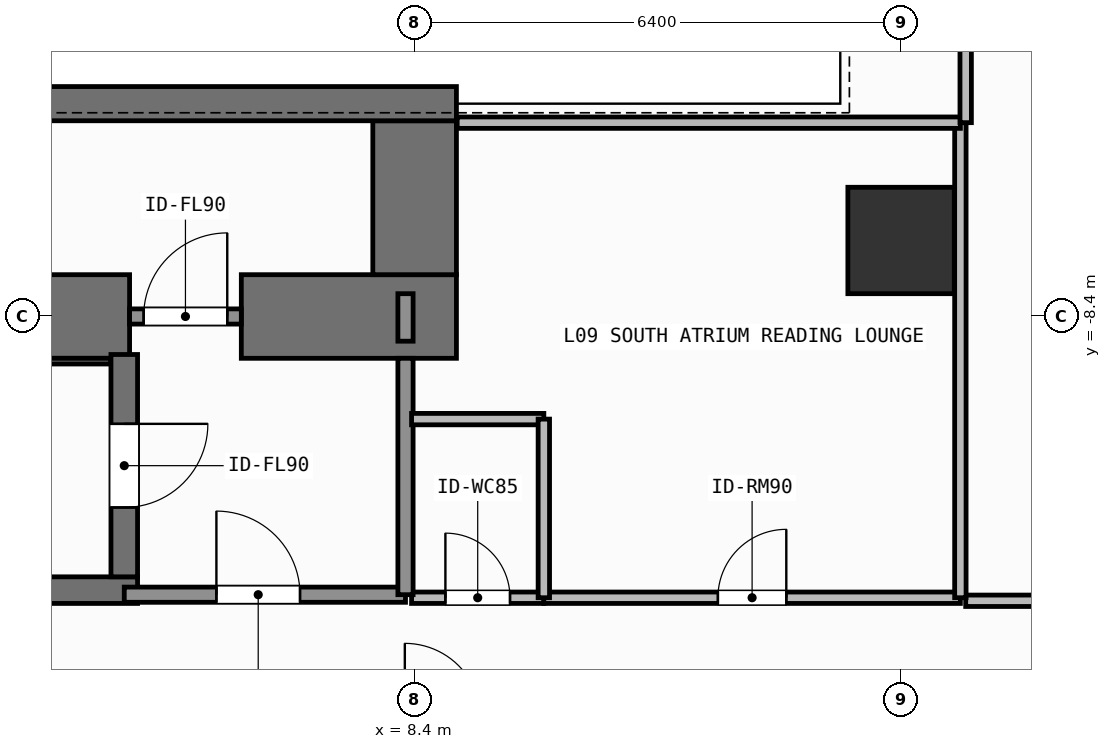
"""IFC4 building model, lengths in metres.
Left out: names, types, materials, properties, quantities, classifications, styles, units other than length and angle.
Written with IfcOpenShell. Run it as: python <this file> out.ifc"""

import sys

from ifc_helpers import new_model, si_unit, direction, frame, frame_2d, origin, origin_2d, place, context, subcontext, project, spatial, rectangle, extrude, element, fill, save


model = new_model("IFC4")
c1 = context("Model", 3, precision=1e-05, world=origin(), true_north=direction((0.0, 1.0)))
c2 = subcontext(c1, "Body", "Model", "MODEL_VIEW")
j1 = project(units=[si_unit("LENGTHUNIT", "METRE"), si_unit("PLANEANGLEUNIT", "RADIAN")], contexts=[c1])
p1 = place(None, origin())
s1 = spatial("IfcSite", under=j1, at=p1, CompositionType="ELEMENT")
p2 = place(p1, origin())
s2 = spatial("IfcBuilding", under=s1, at=p2, CompositionType="ELEMENT")
p3 = place(p2, frame((0.0, 0.0, 34.5)))
s3 = spatial("IfcBuildingStorey", under=s2, at=p3, CompositionType="ELEMENT", Elevation=34.5)
p4 = place(p3, frame((-2.62, -8.4, 0.0), z_axis=(0.0, 0.0, 1.0), x_axis=(1.0, 0.0, 0.0)))
e1 = element("IfcWall", 1, at=p4, inside=s3, PredefinedType="SHEAR", context=c2, shape_type="SweptSolid", body=[
    extrude(rectangle(XDim=7.27, YDim=1.1, at=frame_2d((3.635, 0.0))), origin(), (0.0, 0.0, 1.0), 3.9),
])
p5 = place(p3, frame((6.12, -8.4, 0.0), z_axis=(0.0, 0.0, 1.0), x_axis=(1.0, 0.0, 0.0)))
e2 = element("IfcWall", 2, at=p5, inside=s3, PredefinedType="SHEAR", context=c2, shape_type="SweptSolid", body=[
    extrude(rectangle(XDim=2.83, YDim=1.1, at=frame_2d((1.415, 0.0))), origin(), (0.0, 0.0, 1.0), 3.9),
])
p6 = place(p3, frame((8.4, -7.85, 0.0), z_axis=(0.0, 0.0, 1.0), x_axis=(0.0, 1.0, 0.0)))
e3 = element("IfcWall", 3, at=p6, inside=s3, PredefinedType="SHEAR", context=c2, shape_type="SweptSolid", body=[
    extrude(rectangle(XDim=2.025, YDim=1.1, at=frame_2d((1.013, 0.0))), origin(), (0.0, 0.0, 1.0), 3.9),
])
p7 = place(p3, frame((3.045, -5.6, 0.0), z_axis=(0.0, 0.0, 1.0), x_axis=(1.0, 0.0, 0.0)))
e4 = element("IfcWall", 4, at=p7, inside=s3, PredefinedType="SHEAR", context=c2, shape_type="SweptSolid", body=[
    extrude(rectangle(XDim=5.905, YDim=0.45, at=frame_2d((2.953, 0.0))), origin(), (0.0, 0.0, 1.0), 3.9),
])
p8 = place(p3, frame((-2.555, -12.0, 0.0), z_axis=(0.0, 0.0, 1.0), x_axis=(1.0, 0.0, 0.0)))
e5 = element("IfcWall", 5, at=p8, inside=s3, PredefinedType="SHEAR", context=c2, shape_type="SweptSolid", body=[
    extrude(rectangle(XDim=7.31, YDim=0.35, at=frame_2d((3.655, 0.0))), origin(), (0.0, 0.0, 1.0), 3.9),
])
p9 = place(p3, frame((-2.2, -8.988, 0.0), z_axis=(0.0, 0.0, 1.0), x_axis=(1.0, 0.0, 0.0)))
e6 = element("IfcWall", 6, at=p9, inside=s3, PredefinedType="SHEAR", context=c2, shape_type="SweptSolid", body=[
    extrude(rectangle(XDim=6.6, YDim=0.075, at=frame_2d((3.3, 0.0))), origin(), (0.0, 0.0, 1.0), 3.9),
])
p10 = place(p3, frame((4.58, -8.9, 0.0), z_axis=(0.0, 0.0, 1.0), x_axis=(0.0, -1.0, 0.0)))
e7 = element("IfcWall", 7, at=p10, inside=s3, PredefinedType="SHEAR", context=c2, shape_type="SweptSolid", body=[
    extrude(rectangle(XDim=2.925, YDim=0.35, at=frame_2d((1.462, 0.0))), origin(), (0.0, 0.0, 1.0), 3.9),
])
p11 = place(p10, frame((0.913, 0.0, 0.0)))
e8 = element("IfcOpeningElement", 8, at=p11, cuts=e7, PredefinedType="OPENING", context=c2, shape_type="SweptSolid", body=[
    extrude(rectangle(XDim=1.1, YDim=2.15, at=frame_2d((0.55, 1.075))), frame((0.0, 0.185, 0.0), z_axis=(0.0, -1.0, 0.0), x_axis=(1.0, 0.0, 0.0)), (0.0, 0.0, 1.0), 0.37),
])
p12 = place(p3, frame((14.8, -7.4, 0.0), z_axis=(0.0, 0.0, 1.0), x_axis=(1.0, 0.0, 0.0)))
e9 = element("IfcColumn", 9, at=p12, inside=s3, PredefinedType="COLUMN", context=c2, shape_type="SweptSolid", body=[
    extrude(rectangle(XDim=1.4, YDim=1.4, at=origin_2d()), origin(), (0.0, 0.0, 1.0), 3.9),
])
p13 = place(p3, frame((4.58, -12.06, 0.0), z_axis=(0.0, 0.0, 1.0), x_axis=(1.0, 0.0, 0.0)))
e10 = element("IfcWall", 10, at=p13, inside=s3, PredefinedType="SOLIDWALL", context=c2, shape_type="SweptSolid", body=[
    extrude(rectangle(XDim=3.7, YDim=0.2, at=frame_2d((1.85, 0.0))), origin(), (0.0, 0.0, 1.0), 3.68),
])
p14 = place(p13, frame((1.212, 0.0, 0.0)))
e11 = element("IfcOpeningElement", 11, at=p14, cuts=e10, PredefinedType="OPENING", context=c2, shape_type="SweptSolid", body=[
    extrude(rectangle(XDim=1.1, YDim=2.15, at=frame_2d((0.55, 1.075))), frame((0.0, 0.11, 0.0), z_axis=(0.0, -1.0, 0.0), x_axis=(1.0, 0.0, 0.0)), (0.0, 0.0, 1.0), 0.22),
])
p15 = place(p3, frame((4.65, -8.4, 0.0), z_axis=(0.0, 0.0, 1.0), x_axis=(1.0, 0.0, 0.0)))
e12 = element("IfcWall", 12, at=p15, inside=s3, PredefinedType="SOLIDWALL", context=c2, shape_type="SweptSolid", body=[
    extrude(rectangle(XDim=1.47, YDim=0.2, at=frame_2d((0.735, 0.0))), origin(), (0.0, 0.0, 1.0), 2.72),
])
p16 = place(p15, frame((0.185, 0.0, 0.0)))
e13 = element("IfcOpeningElement", 13, at=p16, cuts=e12, PredefinedType="OPENING", context=c2, shape_type="SweptSolid", body=[
    extrude(rectangle(XDim=1.1, YDim=2.15, at=frame_2d((0.55, 1.075))), frame((0.0, 0.11, 0.0), z_axis=(0.0, -1.0, 0.0), x_axis=(1.0, 0.0, 0.0)), (0.0, 0.0, 1.0), 0.22),
])
p17 = place(p3, frame((8.36, -12.1, 0.0), z_axis=(0.0, 0.0, 1.0), x_axis=(1.0, 0.0, 0.0)))
e14 = element("IfcWall", 14, at=p17, inside=s3, PredefinedType="PARTITIONING", context=c2, shape_type="SweptSolid", body=[
    extrude(rectangle(XDim=1.74, YDim=0.15, at=frame_2d((0.87, 0.0))), origin(), (0.0, 0.0, 1.0), 3.68),
])
p18 = place(p17, frame((0.445, 0.0, 0.0)))
e15 = element("IfcOpeningElement", 15, at=p18, cuts=e14, PredefinedType="OPENING", context=c2, shape_type="SweptSolid", body=[
    extrude(rectangle(XDim=0.85, YDim=2.1, at=frame_2d((0.425, 1.05))), frame((0.0, 0.085, 0.0), z_axis=(0.0, -1.0, 0.0), x_axis=(1.0, 0.0, 0.0)), (0.0, 0.0, 1.0), 0.17),
])
p19 = place(p3, frame((10.1, -12.1, 0.0), z_axis=(0.0, 0.0, 1.0), x_axis=(1.0, 0.0, 0.0)))
e16 = element("IfcWall", 16, at=p19, inside=s3, PredefinedType="PARTITIONING", context=c2, shape_type="SweptSolid", body=[
    extrude(rectangle(XDim=5.48, YDim=0.15, at=frame_2d((2.74, 0.0))), origin(), (0.0, 0.0, 1.0), 3.68),
])
p20 = place(p19, frame((2.29, 0.0, 0.0)))
e17 = element("IfcOpeningElement", 17, at=p20, cuts=e16, PredefinedType="OPENING", context=c2, shape_type="SweptSolid", body=[
    extrude(rectangle(XDim=0.9, YDim=2.1, at=frame_2d((0.45, 1.05))), frame((0.0, 0.085, 0.0), z_axis=(0.0, -1.0, 0.0), x_axis=(1.0, 0.0, 0.0)), (0.0, 0.0, 1.0), 0.17),
])
p21 = place(p3, frame((15.65, -12.14, 0.0), z_axis=(0.0, 0.0, 1.0), x_axis=(1.0, 0.0, 0.0)))
e18 = element("IfcWall", 18, at=p21, inside=s3, PredefinedType="PARTITIONING", context=c2, shape_type="SweptSolid", body=[
    extrude(rectangle(XDim=12.27, YDim=0.15, at=frame_2d((6.135, 0.0))), origin(), (0.0, 0.0, 1.0), 3.68),
])
p22 = place(p21, frame((5.15, 0.0, 0.0)))
e19 = element("IfcOpeningElement", 19, at=p22, cuts=e18, PredefinedType="OPENING", context=c2, shape_type="SweptSolid", body=[
    extrude(rectangle(XDim=0.9, YDim=2.1, at=frame_2d((0.45, 1.05))), frame((0.0, 0.085, 0.0), z_axis=(0.0, -1.0, 0.0), x_axis=(1.0, 0.0, 0.0)), (0.0, 0.0, 1.0), 0.17),
])
p23 = place(p3, frame((8.28, -12.06, 0.0), z_axis=(0.0, 0.0, 1.0), x_axis=(0.0, 1.0, 0.0)))
e20 = element("IfcWall", 20, at=p23, inside=s3, PredefinedType="SOLIDWALL", context=c2, shape_type="SweptSolid", body=[
    extrude(rectangle(XDim=3.11, YDim=0.2, at=frame_2d((1.555, 0.0))), origin(), (0.0, 0.0, 1.0), 3.68),
])
p24 = place(p3, frame((8.28, -8.725, 0.0), z_axis=(0.0, 0.0, 1.0), x_axis=(0.0, 1.0, 0.0)))
e21 = element("IfcWall", 21, at=p24, inside=s3, PredefinedType="SOLIDWALL", context=c2, shape_type="SweptSolid", body=[
    extrude(rectangle(XDim=0.625, YDim=0.2, at=frame_2d((0.312, 0.0))), origin(), (0.0, 0.0, 1.0), 3.68),
])
p25 = place(p3, frame((8.36, -9.75, 0.0), z_axis=(0.0, 0.0, 1.0), x_axis=(1.0, 0.0, 0.0)))
e22 = element("IfcWall", 22, at=p25, inside=s3, PredefinedType="PARTITIONING", context=c2, shape_type="SweptSolid", body=[
    extrude(rectangle(XDim=1.74, YDim=0.15, at=frame_2d((0.87, 0.0))), origin(), (0.0, 0.0, 1.0), 3.68),
])
p26 = place(p3, frame((10.1, -12.1, 0.0), z_axis=(0.0, 0.0, 1.0), x_axis=(0.0, 1.0, 0.0)))
e23 = element("IfcWall", 23, at=p26, inside=s3, PredefinedType="PARTITIONING", context=c2, shape_type="SweptSolid", body=[
    extrude(rectangle(XDim=2.35, YDim=0.15, at=frame_2d((1.175, 0.0))), origin(), (0.0, 0.0, 1.0), 3.68),
])
p27 = place(p3, frame((15.58, -12.1, 0.0), z_axis=(0.0, 0.0, 1.0), x_axis=(0.0, 1.0, 0.0)))
e24 = element("IfcWall", 24, at=p27, inside=s3, PredefinedType="PARTITIONING", context=c2, shape_type="SweptSolid", body=[
    extrude(rectangle(XDim=6.25, YDim=0.15, at=frame_2d((3.125, 0.0))), origin(), (0.0, 0.0, 1.0), 3.68),
])
p28 = place(p3, frame((8.96, -5.85, 0.0), z_axis=(0.0, 0.0, 1.0), x_axis=(1.0, 0.0, 0.0)))
e25 = element("IfcWall", 25, at=p28, inside=s3, PredefinedType="PARTITIONING", context=c2, shape_type="SweptSolid", body=[
    extrude(rectangle(XDim=6.62, YDim=0.15, at=frame_2d((3.31, 0.0))), origin(), (0.0, 0.0, 1.0), 3.68),
])
p29 = place(p3, frame((15.65, -5.85, 0.0), z_axis=(0.0, 0.0, 1.0), x_axis=(0.0, 1.0, 0.0)))
e26 = element("IfcWall", 26, at=p29, inside=s3, PredefinedType="PARTITIONING", context=c2, shape_type="SweptSolid", body=[
    extrude(rectangle(XDim=4.05, YDim=0.15, at=frame_2d((2.025, 0.0))), origin(), (0.0, 0.0, 1.0), 3.68),
])
p30 = place(p11, origin())
e27 = element("IfcDoor", 27, at=p30, inside=s3, OperationType="SINGLE_SWING_LEFT", PredefinedType="DOOR", context=c2, shape_type="SweptSolid", body=[
    extrude(rectangle(XDim=1.1, YDim=2.15, at=frame_2d((0.55, 1.075))), frame((0.0, 0.025, 0.0), z_axis=(0.0, -1.0, 0.0), x_axis=(1.0, 0.0, 0.0)), (0.0, 0.0, 1.0), 0.05),
])
fill(e8, e27)
p31 = place(p14, origin())
e28 = element("IfcDoor", 28, at=p31, inside=s3, OperationType="SINGLE_SWING_LEFT", PredefinedType="DOOR", context=c2, shape_type="SweptSolid", body=[
    extrude(rectangle(XDim=1.1, YDim=2.15, at=frame_2d((0.55, 1.075))), frame((0.0, 0.025, 0.0), z_axis=(0.0, -1.0, 0.0), x_axis=(1.0, 0.0, 0.0)), (0.0, 0.0, 1.0), 0.05),
])
fill(e11, e28)
p32 = place(p16, origin())
e29 = element("IfcDoor", 29, at=p32, inside=s3, OperationType="SINGLE_SWING_RIGHT", PredefinedType="DOOR", context=c2, shape_type="SweptSolid", body=[
    extrude(rectangle(XDim=1.1, YDim=2.15, at=frame_2d((0.55, 1.075))), frame((0.0, 0.025, 0.0), z_axis=(0.0, -1.0, 0.0), x_axis=(1.0, 0.0, 0.0)), (0.0, 0.0, 1.0), 0.05),
])
fill(e13, e29)
p33 = place(p18, origin())
e30 = element("IfcDoor", 30, at=p33, inside=s3, OperationType="SINGLE_SWING_LEFT", PredefinedType="DOOR", context=c2, shape_type="SweptSolid", body=[
    extrude(rectangle(XDim=0.85, YDim=2.1, at=frame_2d((0.425, 1.05))), frame((0.0, 0.025, 0.0), z_axis=(0.0, -1.0, 0.0), x_axis=(1.0, 0.0, 0.0)), (0.0, 0.0, 1.0), 0.05),
])
fill(e15, e30)
p34 = place(p20, origin())
e31 = element("IfcDoor", 31, at=p34, inside=s3, OperationType="SINGLE_SWING_RIGHT", PredefinedType="DOOR", context=c2, shape_type="SweptSolid", body=[
    extrude(rectangle(XDim=0.9, YDim=2.1, at=frame_2d((0.45, 1.05))), frame((0.0, 0.025, 0.0), z_axis=(0.0, -1.0, 0.0), x_axis=(1.0, 0.0, 0.0)), (0.0, 0.0, 1.0), 0.05),
])
fill(e17, e31)
save(model, sys.argv[1])
